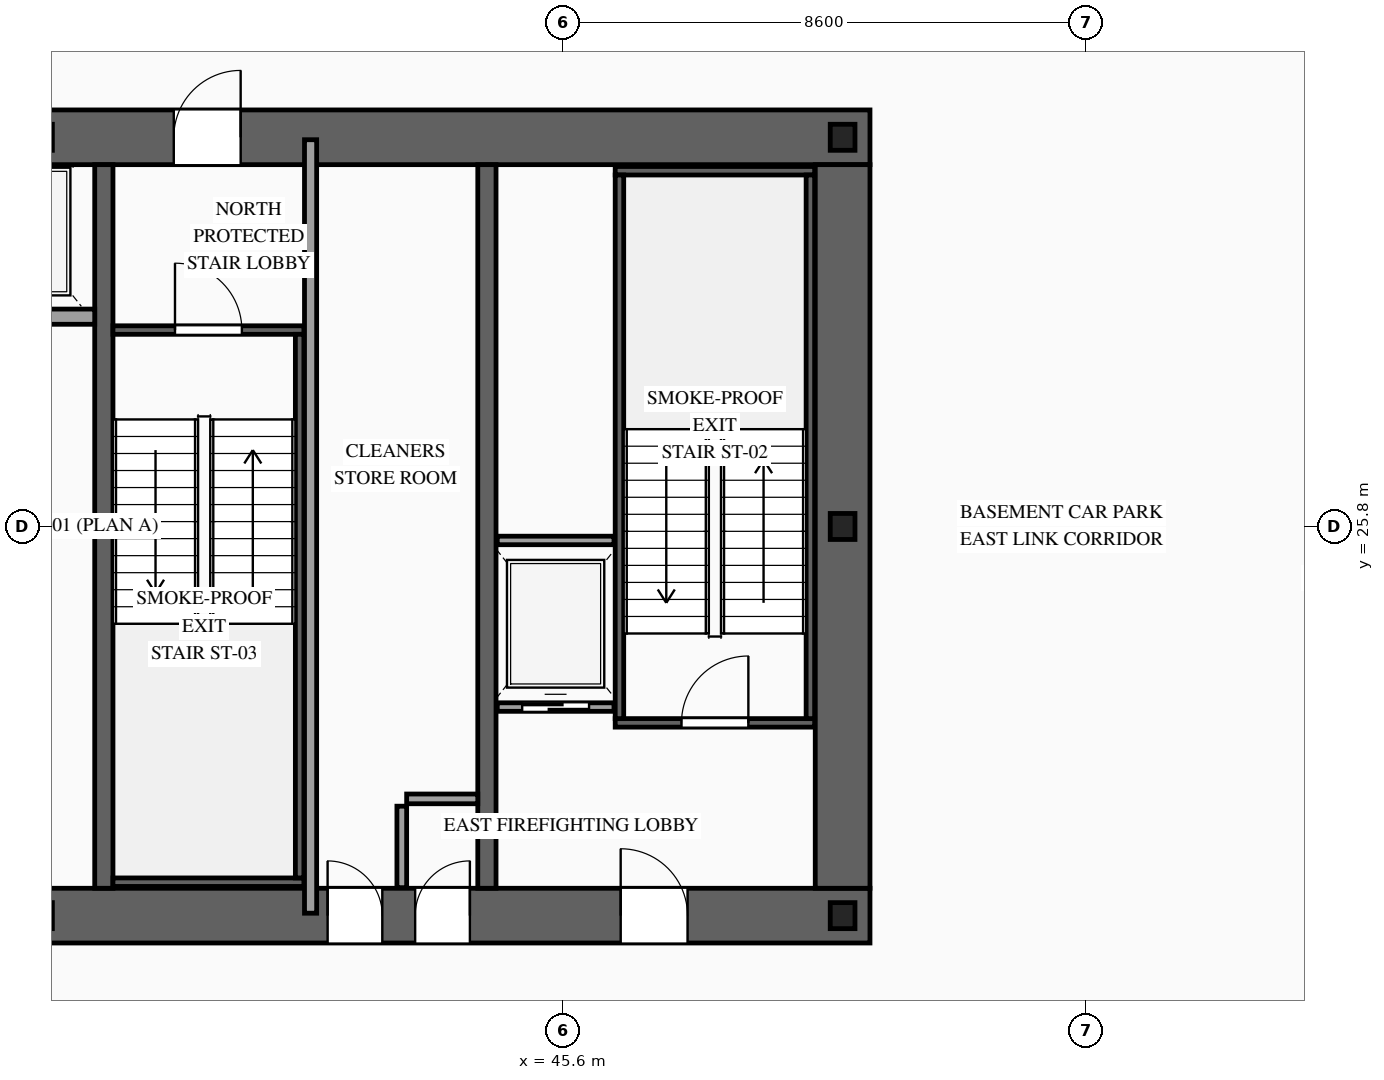
"""IFC4 building model, lengths in metres.
Left out: names, types, materials, properties, quantities, classifications, styles, units other than length and angle.
Written with IfcOpenShell. Run it as: python <this file> out.ifc"""

import sys

from ifc_helpers import new_model, si_unit, direction, frame, frame_2d, origin, origin_2d, place, context, subcontext, project, spatial, rectangle, i_section, extrude, source, transform, mapped, element, fill, save


model = new_model("IFC4")
c1 = context("Model", 3, precision=1e-05, world=origin(), true_north=direction((0.0, 1.0)))
c2 = subcontext(c1, "Body", "Model", "MODEL_VIEW")
j1 = project(units=[si_unit("LENGTHUNIT", "METRE"), si_unit("PLANEANGLEUNIT", "RADIAN")], contexts=[c1])
p1 = place(None, origin())
s1 = spatial("IfcSite", under=j1, at=p1, CompositionType="ELEMENT")
p2 = place(p1, origin())
s2 = spatial("IfcBuilding", under=s1, at=p2, CompositionType="ELEMENT")
p3 = place(p2, frame((0.0, 0.0, -9.0)))
s3 = spatial("IfcBuildingStorey", under=s2, at=p3, CompositionType="ELEMENT", Elevation=-9.0)
p4 = place(p3, frame((23.35, 19.4, 0.0), z_axis=(0.0, 0.0, 1.0), x_axis=(1.0, 0.0, 0.0)))
e1 = element("IfcWall", 1, at=p4, inside=s3, PredefinedType="SHEAR", context=c2, shape_type="SweptSolid", body=[
    extrude(rectangle(XDim=27.3, YDim=0.9, at=frame_2d((13.65, 0.0))), origin(), (0.0, 0.0, 1.0), 4.5),
])
p5 = place(p4, frame((2.1, 0.0, 0.0)))
e2 = element("IfcOpeningElement", 2, at=p5, cuts=e1, PredefinedType="OPENING", context=c2, shape_type="SweptSolid", body=[
    extrude(rectangle(XDim=1.1, YDim=2.2, at=frame_2d((0.55, 1.1))), frame((0.0, 0.465, 0.0), z_axis=(0.0, -1.0, 0.0), x_axis=(1.0, 0.0, 0.0)), (0.0, 0.0, 1.0), 0.93),
])
p6 = place(p4, frame((10.0, 0.0, 0.0)))
e3 = element("IfcOpeningElement", 3, at=p6, cuts=e1, PredefinedType="OPENING", context=c2, shape_type="SweptSolid", body=[
    extrude(rectangle(XDim=1.1, YDim=2.2, at=frame_2d((0.55, 1.1))), frame((0.0, 0.465, 0.0), z_axis=(0.0, -1.0, 0.0), x_axis=(1.0, 0.0, 0.0)), (0.0, 0.0, 1.0), 0.93),
])
p7 = place(p4, frame((23.2, 0.0, 0.0)))
e4 = element("IfcOpeningElement", 4, at=p7, cuts=e1, PredefinedType="OPENING", context=c2, shape_type="SweptSolid", body=[
    extrude(rectangle(XDim=1.1, YDim=2.2, at=frame_2d((0.55, 1.1))), frame((0.0, 0.465, 0.0), z_axis=(0.0, -1.0, 0.0), x_axis=(1.0, 0.0, 0.0)), (0.0, 0.0, 1.0), 0.93),
])
p8 = place(p4, frame((19.82, 0.0, 0.0)))
e5 = element("IfcOpeningElement", 5, at=p8, cuts=e1, PredefinedType="OPENING", context=c2, shape_type="SweptSolid", body=[
    extrude(rectangle(XDim=0.9, YDim=2.15, at=frame_2d((0.45, 1.075))), frame((0.0, 0.465, 0.0), z_axis=(0.0, -1.0, 0.0), x_axis=(1.0, 0.0, 0.0)), (0.0, 0.0, 1.0), 0.93),
])
p9 = place(p4, frame((18.38, 0.0, 0.0)))
e6 = element("IfcOpeningElement", 6, at=p9, cuts=e1, PredefinedType="OPENING", context=c2, shape_type="SweptSolid", body=[
    extrude(rectangle(XDim=0.9, YDim=2.15, at=frame_2d((0.45, 1.075))), frame((0.0, 0.465, 0.0), z_axis=(0.0, -1.0, 0.0), x_axis=(1.0, 0.0, 0.0)), (0.0, 0.0, 1.0), 0.93),
])
p10 = place(p3, frame((23.35, 32.2, 0.0), z_axis=(0.0, 0.0, 1.0), x_axis=(1.0, 0.0, 0.0)))
e7 = element("IfcWall", 7, at=p10, inside=s3, PredefinedType="SHEAR", context=c2, shape_type="SweptSolid", body=[
    extrude(rectangle(XDim=27.3, YDim=0.9, at=frame_2d((13.65, 0.0))), origin(), (0.0, 0.0, 1.0), 4.5),
])
p11 = place(p10, frame((4.72, 0.0, 0.0)))
e8 = element("IfcOpeningElement", 8, at=p11, cuts=e7, PredefinedType="OPENING", context=c2, shape_type="SweptSolid", body=[
    extrude(rectangle(XDim=0.9, YDim=2.15, at=frame_2d((0.45, 1.075))), frame((0.0, 0.465, 0.0), z_axis=(0.0, -1.0, 0.0), x_axis=(1.0, 0.0, 0.0)), (0.0, 0.0, 1.0), 0.93),
])
p12 = place(p10, frame((10.0, 0.0, 0.0)))
e9 = element("IfcOpeningElement", 9, at=p12, cuts=e7, PredefinedType="OPENING", context=c2, shape_type="SweptSolid", body=[
    extrude(rectangle(XDim=1.1, YDim=2.2, at=frame_2d((0.55, 1.1))), frame((0.0, 0.465, 0.0), z_axis=(0.0, -1.0, 0.0), x_axis=(1.0, 0.0, 0.0)), (0.0, 0.0, 1.0), 0.93),
])
p13 = place(p10, frame((15.85, 0.0, 0.0)))
e10 = element("IfcOpeningElement", 10, at=p13, cuts=e7, PredefinedType="OPENING", context=c2, shape_type="SweptSolid", body=[
    extrude(rectangle(XDim=1.1, YDim=2.2, at=frame_2d((0.55, 1.1))), frame((0.0, 0.465, 0.0), z_axis=(0.0, -1.0, 0.0), x_axis=(1.0, 0.0, 0.0)), (0.0, 0.0, 1.0), 0.93),
])
m1 = source(origin(), c2, "Body", "SweptSolid", [
    extrude(rectangle(XDim=11.9, YDim=0.9, at=frame_2d((5.95, 0.0))), origin(), (0.0, 0.0, 1.0), 4.5),
])
p14 = place(p3, frame((50.2, 19.85, 0.0), z_axis=(0.0, 0.0, 1.0), x_axis=(0.0, 1.0, 0.0)))
e11 = element("IfcWall", 11, at=p14, inside=s3, PredefinedType="SHEAR", context=c2, shape_type="MappedRepresentation", body=[
    mapped(m1, transform((0.0, 0.0, 0.0), scale=1.0)),
])
m2 = source(origin(), c2, "Body", "SweptSolid", [
    extrude(rectangle(XDim=11.9, YDim=0.3, at=frame_2d((5.95, 0.0))), origin(), (0.0, 0.0, 1.0), 4.5),
])
for number, where, z_axis, x_axis in (
    (12, (38.05, 19.85, 0.0), (0.0, 0.0, 1.0), (0.0, 1.0, 0.0)),
    (13, (44.35, 19.85, 0.0), (0.0, 0.0, 1.0), (0.0, 1.0, 0.0)),
):
    element("IfcWall", number, at=place(p3, frame(where, z_axis=z_axis, x_axis=x_axis)), inside=s3, PredefinedType="SOLIDWALL", context=c2, shape_type="MappedRepresentation", body=[
        mapped(m2, transform((0.0, 0.0, 0.0), scale=1.0)),
    ])
m3 = source(origin(), c2, "Body", "SweptSolid", [
    extrude(i_section(OverallWidth=0.407, OverallDepth=0.428, WebThickness=0.02, FlangeThickness=0.035, at=origin_2d()), origin(), (0.0, 0.0, 1.0), 4.5),
])
for number, where, z_axis, x_axis in (
    (14, (37.0, 19.4, 0.0), (0.0, 0.0, 1.0), (1.0, 0.0, 0.0)),
    (15, (50.2, 19.4, 0.0), (0.0, 0.0, 1.0), (1.0, 0.0, 0.0)),
    (16, (50.2, 25.8, 0.0), (0.0, 0.0, 1.0), (1.0, 0.0, 0.0)),
    (17, (37.0, 32.2, 0.0), (0.0, 0.0, 1.0), (1.0, 0.0, 0.0)),
    (18, (50.2, 32.2, 0.0), (0.0, 0.0, 1.0), (1.0, 0.0, 0.0)),
):
    element("IfcColumn", number, at=place(p3, frame(where, z_axis=z_axis, x_axis=x_axis)), inside=s3, PredefinedType="COLUMN", context=c2, shape_type="MappedRepresentation", body=[
        mapped(m3, transform((0.0, 0.0, 0.0), scale=1.0)),
    ])
p15 = place(p3, frame((44.52, 22.83, 0.0), z_axis=(0.0, 0.0, 1.0), x_axis=(1.0, 0.0, 0.0)))
e19 = element("IfcWall", 19, at=p15, inside=s3, PredefinedType="SOLIDWALL", context=c2, shape_type="SweptSolid", body=[
    extrude(rectangle(XDim=1.92, YDim=0.14, at=frame_2d((0.96, 0.0))), origin(), (0.0, 0.0, 1.0), 4.2),
])
p16 = place(p15, frame((0.41, 0.0, 0.0)))
e20 = element("IfcOpeningElement", 20, at=p16, cuts=e19, PredefinedType="OPENING", context=c2, shape_type="SweptSolid", body=[
    extrude(rectangle(XDim=1.1, YDim=2.2, at=frame_2d((0.55, 1.1))), frame((0.0, 0.085, 0.0), z_axis=(0.0, -1.0, 0.0), x_axis=(1.0, 0.0, 0.0)), (0.0, 0.0, 1.0), 0.17),
])
m4 = source(origin(), c2, "Body", "SweptSolid", [
    extrude(rectangle(XDim=1.92, YDim=0.14, at=frame_2d((0.96, 0.0))), origin(), (0.0, 0.0, 1.0), 4.2),
])
p17 = place(p3, frame((44.52, 25.57, 0.0), z_axis=(0.0, 0.0, 1.0), x_axis=(1.0, 0.0, 0.0)))
e21 = element("IfcWall", 21, at=p17, inside=s3, PredefinedType="SOLIDWALL", context=c2, shape_type="MappedRepresentation", body=[
    mapped(m4, transform((0.0, 0.0, 0.0), scale=1.0)),
])
m5 = source(origin(), c2, "Body", "SweptSolid", [
    extrude(rectangle(XDim=2.4, YDim=0.25, at=frame_2d((1.2, 0.0))), origin(), (0.0, 0.0, 1.0), 4.2),
])
p18 = place(p3, frame((35.5, 29.25, 0.0), z_axis=(0.0, 0.0, 1.0), x_axis=(1.0, 0.0, 0.0)))
e22 = element("IfcWall", 22, at=p18, inside=s3, PredefinedType="SOLIDWALL", context=c2, shape_type="MappedRepresentation", body=[
    mapped(m5, transform((0.0, 0.0, 0.0), scale=1.0)),
])
p19 = place(p3, frame((46.46, 22.57, 0.0), z_axis=(0.0, 0.0, 1.0), x_axis=(1.0, 0.0, 0.0)))
e23 = element("IfcWall", 23, at=p19, inside=s3, PredefinedType="SOLIDWALL", context=c2, shape_type="SweptSolid", body=[
    extrude(rectangle(XDim=3.28, YDim=0.14, at=frame_2d((1.64, 0.0))), origin(), (0.0, 0.0, 1.0), 4.2),
])
p20 = place(p19, frame((1.09, 0.0, 0.0)))
e24 = element("IfcOpeningElement", 24, at=p20, cuts=e23, PredefinedType="OPENING", context=c2, shape_type="SweptSolid", body=[
    extrude(rectangle(XDim=1.1, YDim=2.2, at=frame_2d((0.55, 1.1))), frame((0.0, 0.085, 0.0), z_axis=(0.0, -1.0, 0.0), x_axis=(1.0, 0.0, 0.0)), (0.0, 0.0, 1.0), 0.17),
])
m6 = source(origin(), c2, "Body", "SweptSolid", [
    extrude(rectangle(XDim=3.28, YDim=0.14, at=frame_2d((1.64, 0.0))), origin(), (0.0, 0.0, 1.0), 4.2),
])
p21 = place(p3, frame((46.46, 31.65, 0.0), z_axis=(0.0, 0.0, 1.0), x_axis=(1.0, 0.0, 0.0)))
e25 = element("IfcWall", 25, at=p21, inside=s3, PredefinedType="SOLIDWALL", context=c2, shape_type="MappedRepresentation", body=[
    mapped(m6, transform((0.0, 0.0, 0.0), scale=1.0)),
])
m7 = source(origin(), c2, "Body", "SweptSolid", [
    extrude(rectangle(XDim=8.94, YDim=0.14, at=frame_2d((4.47, 0.0))), origin(), (0.0, 0.0, 1.0), 4.2),
])
for number, where, z_axis, x_axis in (
    (26, (46.53, 22.64, 0.0), (0.0, 0.0, 1.0), (0.0, 1.0, 0.0)),
    (27, (49.67, 22.64, 0.0), (0.0, 0.0, 1.0), (0.0, 1.0, 0.0)),
):
    element("IfcWall", number, at=place(p3, frame(where, z_axis=z_axis, x_axis=x_axis)), inside=s3, PredefinedType="SOLIDWALL", context=c2, shape_type="MappedRepresentation", body=[
        mapped(m7, transform((0.0, 0.0, 0.0), scale=1.0)),
    ])
p22 = place(p3, frame((38.2, 29.03, 0.0), z_axis=(0.0, 0.0, 1.0), x_axis=(1.0, 0.0, 0.0)))
e28 = element("IfcWall", 28, at=p22, inside=s3, PredefinedType="SOLIDWALL", context=c2, shape_type="SweptSolid", body=[
    extrude(rectangle(XDim=3.14, YDim=0.14, at=frame_2d((1.57, 0.0))), origin(), (0.0, 0.0, 1.0), 4.2),
])
p23 = place(p22, frame((1.02, 0.0, 0.0)))
e29 = element("IfcOpeningElement", 29, at=p23, cuts=e28, PredefinedType="OPENING", context=c2, shape_type="SweptSolid", body=[
    extrude(rectangle(XDim=1.1, YDim=2.2, at=frame_2d((0.55, 1.1))), frame((0.0, 0.085, 0.0), z_axis=(0.0, -1.0, 0.0), x_axis=(1.0, 0.0, 0.0)), (0.0, 0.0, 1.0), 0.17),
])
m8 = source(origin(), c2, "Body", "SweptSolid", [
    extrude(rectangle(XDim=3.14, YDim=0.14, at=frame_2d((1.57, 0.0))), origin(), (0.0, 0.0, 1.0), 4.2),
])
p24 = place(p3, frame((38.2, 19.95, 0.0), z_axis=(0.0, 0.0, 1.0), x_axis=(1.0, 0.0, 0.0)))
e30 = element("IfcWall", 30, at=p24, inside=s3, PredefinedType="SOLIDWALL", context=c2, shape_type="MappedRepresentation", body=[
    mapped(m8, transform((0.0, 0.0, 0.0), scale=1.0)),
])
m9 = source(origin(), c2, "Body", "SweptSolid", [
    extrude(rectangle(XDim=8.94, YDim=0.14, at=frame_2d((4.47, 0.0))), origin(), (0.0, 0.0, 1.0), 4.2),
])
p25 = place(p3, frame((41.27, 20.02, 0.0), z_axis=(0.0, 0.0, 1.0), x_axis=(0.0, 1.0, 0.0)))
e31 = element("IfcWall", 31, at=p25, inside=s3, PredefinedType="SOLIDWALL", context=c2, shape_type="MappedRepresentation", body=[
    mapped(m9, transform((0.0, 0.0, 0.0), scale=1.0)),
])
m10 = source(origin(), c2, "Body", "SweptSolid", [
    extrude(rectangle(XDim=1.34, YDim=0.16, at=frame_2d((0.67, 0.0))), origin(), (0.0, 0.0, 1.0), 4.2),
])
p26 = place(p3, frame((42.95, 19.86, 0.0), z_axis=(0.0, 0.0, 1.0), x_axis=(0.0, 1.0, 0.0)))
e32 = element("IfcWall", 32, at=p26, inside=s3, PredefinedType="PARTITIONING", context=c2, shape_type="MappedRepresentation", body=[
    mapped(m10, transform((0.0, 0.0, 0.0), scale=1.0)),
])
m11 = source(origin(), c2, "Body", "SweptSolid", [
    extrude(rectangle(XDim=1.17, YDim=0.16, at=frame_2d((0.585, 0.0))), origin(), (0.0, 0.0, 1.0), 4.2),
])
p27 = place(p3, frame((43.03, 21.32, 0.0), z_axis=(0.0, 0.0, 1.0), x_axis=(1.0, 0.0, 0.0)))
e33 = element("IfcWall", 33, at=p27, inside=s3, PredefinedType="PARTITIONING", context=c2, shape_type="MappedRepresentation", body=[
    mapped(m11, transform((0.0, 0.0, 0.0), scale=1.0)),
])
m12 = source(origin(), c2, "Body", "SweptSolid", [
    extrude(rectangle(XDim=12.72, YDim=0.2, at=frame_2d((6.36, 0.0))), origin(), (0.0, 0.0, 1.0), 4.2),
])
p28 = place(p3, frame((41.45, 19.44, 0.0), z_axis=(0.0, 0.0, 1.0), x_axis=(0.0, 1.0, 0.0)))
e34 = element("IfcWall", 34, at=p28, inside=s3, PredefinedType="PARTITIONING", context=c2, shape_type="MappedRepresentation", body=[
    mapped(m12, transform((0.0, 0.0, 0.0), scale=1.0)),
])
m13 = source(origin(), c2, "Body", "SweptSolid", [
    extrude(rectangle(XDim=1.1, YDim=2.2, at=frame_2d((0.55, 1.1))), frame((0.0, 0.025, 0.0), z_axis=(0.0, -1.0, 0.0), x_axis=(1.0, 0.0, 0.0)), (0.0, 0.0, 1.0), 0.05),
])
p29 = place(p16, origin())
e35 = element("IfcDoor", 35, at=p29, inside=s3, OperationType="SLIDING_TO_RIGHT", PredefinedType="DOOR", context=c2, shape_type="MappedRepresentation", body=[
    mapped(m13, transform((0.0, 0.0, 0.0), scale=1.0)),
])
fill(e20, e35)
m14 = source(origin(), c2, "Body", "SweptSolid", [
    extrude(rectangle(XDim=1.1, YDim=2.2, at=frame_2d((0.55, 1.1))), frame((0.0, 0.025, 0.0), z_axis=(0.0, -1.0, 0.0), x_axis=(1.0, 0.0, 0.0)), (0.0, 0.0, 1.0), 0.05),
])
p30 = place(p20, origin())
e36 = element("IfcDoor", 36, at=p30, inside=s3, OperationType="SINGLE_SWING_RIGHT", PredefinedType="DOOR", context=c2, shape_type="MappedRepresentation", body=[
    mapped(m14, transform((0.0, 0.0, 0.0), scale=1.0)),
])
fill(e24, e36)
p31 = place(p23, origin())
e37 = element("IfcDoor", 37, at=p31, inside=s3, OperationType="SINGLE_SWING_LEFT", PredefinedType="DOOR", context=c2, shape_type="MappedRepresentation", body=[
    mapped(m14, transform((0.0, 0.0, 0.0), scale=1.0)),
])
fill(e29, e37)
p32 = place(p7, origin())
e38 = element("IfcDoor", 38, at=p32, inside=s3, OperationType="SINGLE_SWING_LEFT", PredefinedType="DOOR", context=c2, shape_type="MappedRepresentation", body=[
    mapped(m14, transform((0.0, 0.0, 0.0), scale=1.0)),
])
fill(e4, e38)
p33 = place(p13, origin())
e39 = element("IfcDoor", 39, at=p33, inside=s3, OperationType="SINGLE_SWING_RIGHT", PredefinedType="DOOR", context=c2, shape_type="MappedRepresentation", body=[
    mapped(m14, transform((0.0, 0.0, 0.0), scale=1.0)),
])
fill(e10, e39)
m15 = source(origin(), c2, "Body", "SweptSolid", [
    extrude(rectangle(XDim=0.9, YDim=2.15, at=frame_2d((0.45, 1.075))), frame((0.0, 0.025, 0.0), z_axis=(0.0, -1.0, 0.0), x_axis=(1.0, 0.0, 0.0)), (0.0, 0.0, 1.0), 0.05),
])
p34 = place(p8, origin())
e40 = element("IfcDoor", 40, at=p34, inside=s3, OperationType="SINGLE_SWING_RIGHT", PredefinedType="DOOR", context=c2, shape_type="MappedRepresentation", body=[
    mapped(m15, transform((0.0, 0.0, 0.0), scale=1.0)),
])
fill(e5, e40)
p35 = place(p9, origin())
e41 = element("IfcDoor", 41, at=p35, inside=s3, OperationType="SINGLE_SWING_LEFT", PredefinedType="DOOR", context=c2, shape_type="MappedRepresentation", body=[
    mapped(m15, transform((0.0, 0.0, 0.0), scale=1.0)),
])
fill(e6, e41)
save(model, sys.argv[1])
